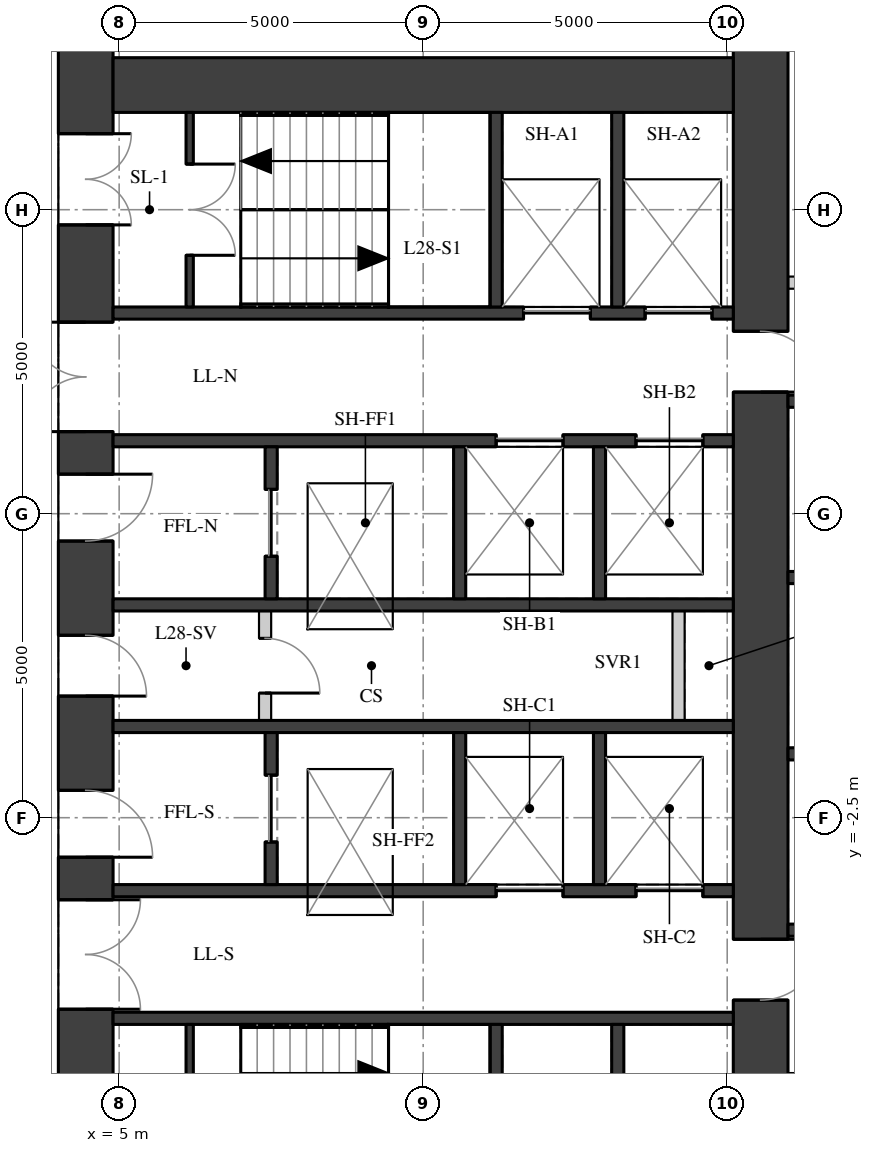
"""IFC4 building model, lengths in metres.
Left out: names, types, materials, properties, quantities, classifications, styles, units other than length and angle.
Written with IfcOpenShell. Run it as: python <this file> out.ifc"""

import sys

from ifc_helpers import new_model, si_unit, direction, frame, frame_2d, origin, place, context, subcontext, project, spatial, rectangle, extrude, element, fill, save


model = new_model("IFC4")
c1 = context("Model", 3, precision=1e-05, world=origin(), true_north=direction((0.0, 1.0)))
c2 = subcontext(c1, "Body", "Model", "MODEL_VIEW")
j1 = project(units=[si_unit("LENGTHUNIT", "METRE"), si_unit("PLANEANGLEUNIT", "RADIAN")], contexts=[c1])
p1 = place(None, origin())
s1 = spatial("IfcSite", under=j1, at=p1, CompositionType="ELEMENT")
p2 = place(p1, origin())
s2 = spatial("IfcBuilding", under=s1, at=p2, CompositionType="ELEMENT")
p3 = place(p2, frame((0.0, 0.0, 102.1)))
s3 = spatial("IfcBuildingStorey", under=s2, at=p3, CompositionType="ELEMENT", Elevation=102.1)
p4 = place(p3, frame((4.45, -11.1, 0.0), z_axis=(0.0, 0.0, 1.0), x_axis=(0.0, 1.0, 0.0)))
e1 = element("IfcWall", 1, at=p4, inside=s3, PredefinedType="SHEAR", context=c2, shape_type="SweptSolid", body=[
    extrude(rectangle(XDim=22.2, YDim=0.9, at=frame_2d((11.1, 0.0))), origin(), (0.0, 0.0, 1.0), 3.02),
])
p5 = place(p4, frame((2.35, 0.0, 0.0)))
e2 = element("IfcOpeningElement", 2, at=p5, cuts=e1, PredefinedType="OPENING", context=c2, shape_type="SweptSolid", body=[
    extrude(rectangle(XDim=1.5, YDim=2.1, at=frame_2d((0.75, 1.05))), frame((0.0, 0.46, 0.0), z_axis=(0.0, -1.0, 0.0), x_axis=(1.0, 0.0, 0.0)), (0.0, 0.0, 1.0), 0.92),
])
p6 = place(p4, frame((5.45, 0.0, 0.0)))
e3 = element("IfcOpeningElement", 3, at=p6, cuts=e1, PredefinedType="OPENING", context=c2, shape_type="SweptSolid", body=[
    extrude(rectangle(XDim=1.8, YDim=2.1, at=frame_2d((0.9, 1.05))), frame((0.0, 0.46, 0.0), z_axis=(0.0, -1.0, 0.0), x_axis=(1.0, 0.0, 0.0)), (0.0, 0.0, 1.0), 0.92),
])
p7 = place(p4, frame((7.95, 0.0, 0.0)))
e4 = element("IfcOpeningElement", 4, at=p7, cuts=e1, PredefinedType="OPENING", context=c2, shape_type="SweptSolid", body=[
    extrude(rectangle(XDim=1.1, YDim=2.1, at=frame_2d((0.55, 1.05))), frame((0.0, 0.46, 0.0), z_axis=(0.0, -1.0, 0.0), x_axis=(1.0, 0.0, 0.0)), (0.0, 0.0, 1.0), 0.92),
])
p8 = place(p4, frame((10.6, 0.0, 0.0)))
e5 = element("IfcOpeningElement", 5, at=p8, cuts=e1, PredefinedType="OPENING", context=c2, shape_type="SweptSolid", body=[
    extrude(rectangle(XDim=1.0, YDim=2.1, at=frame_2d((0.5, 1.05))), frame((0.0, 0.46, 0.0), z_axis=(0.0, -1.0, 0.0), x_axis=(1.0, 0.0, 0.0)), (0.0, 0.0, 1.0), 0.92),
])
p9 = place(p4, frame((13.15, 0.0, 0.0)))
e6 = element("IfcOpeningElement", 6, at=p9, cuts=e1, PredefinedType="OPENING", context=c2, shape_type="SweptSolid", body=[
    extrude(rectangle(XDim=1.1, YDim=2.1, at=frame_2d((0.55, 1.05))), frame((0.0, 0.46, 0.0), z_axis=(0.0, -1.0, 0.0), x_axis=(1.0, 0.0, 0.0)), (0.0, 0.0, 1.0), 0.92),
])
p10 = place(p4, frame((14.95, 0.0, 0.0)))
e7 = element("IfcOpeningElement", 7, at=p10, cuts=e1, PredefinedType="OPENING", context=c2, shape_type="SweptSolid", body=[
    extrude(rectangle(XDim=1.8, YDim=2.1, at=frame_2d((0.9, 1.05))), frame((0.0, 0.46, 0.0), z_axis=(0.0, -1.0, 0.0), x_axis=(1.0, 0.0, 0.0)), (0.0, 0.0, 1.0), 0.92),
])
p11 = place(p4, frame((18.35, 0.0, 0.0)))
e8 = element("IfcOpeningElement", 8, at=p11, cuts=e1, PredefinedType="OPENING", context=c2, shape_type="SweptSolid", body=[
    extrude(rectangle(XDim=1.5, YDim=2.1, at=frame_2d((0.75, 1.05))), frame((0.0, 0.46, 0.0), z_axis=(0.0, -1.0, 0.0), x_axis=(1.0, 0.0, 0.0)), (0.0, 0.0, 1.0), 0.92),
])
p12 = place(p3, frame((15.55, -11.1, 0.0), z_axis=(0.0, 0.0, 1.0), x_axis=(0.0, 1.0, 0.0)))
e9 = element("IfcWall", 9, at=p12, inside=s3, PredefinedType="SHEAR", context=c2, shape_type="SweptSolid", body=[
    extrude(rectangle(XDim=22.2, YDim=0.9, at=frame_2d((11.1, 0.0))), origin(), (0.0, 0.0, 1.0), 3.02),
])
p13 = place(p12, frame((15.6, 0.0, 0.0)))
e10 = element("IfcOpeningElement", 10, at=p13, cuts=e9, PredefinedType="OPENING", context=c2, shape_type="SweptSolid", body=[
    extrude(rectangle(XDim=1.0, YDim=2.1, at=frame_2d((0.5, 1.05))), frame((0.0, 0.46, 0.0), z_axis=(0.0, -1.0, 0.0), x_axis=(1.0, 0.0, 0.0)), (0.0, 0.0, 1.0), 0.92),
])
p14 = place(p12, frame((5.6, 0.0, 0.0)))
e11 = element("IfcOpeningElement", 11, at=p14, cuts=e9, PredefinedType="OPENING", context=c2, shape_type="SweptSolid", body=[
    extrude(rectangle(XDim=1.0, YDim=2.1, at=frame_2d((0.5, 1.05))), frame((0.0, 0.46, 0.0), z_axis=(0.0, -1.0, 0.0), x_axis=(1.0, 0.0, 0.0)), (0.0, 0.0, 1.0), 0.92),
])
p15 = place(p3, frame((4.9, 9.55, 0.0), z_axis=(0.0, 0.0, 1.0), x_axis=(1.0, 0.0, 0.0)))
e12 = element("IfcWall", 12, at=p15, inside=s3, PredefinedType="SHEAR", context=c2, shape_type="SweptSolid", body=[
    extrude(rectangle(XDim=10.2, YDim=0.9, at=frame_2d((5.1, 0.0))), origin(), (0.0, 0.0, 1.0), 3.02),
])
p16 = place(p3, frame((4.9, 5.8, 0.0), z_axis=(0.0, 0.0, 1.0), x_axis=(1.0, 0.0, 0.0)))
e13 = element("IfcWall", 13, at=p16, inside=s3, PredefinedType="SHEAR", context=c2, shape_type="SweptSolid", body=[
    extrude(rectangle(XDim=10.2, YDim=0.2, at=frame_2d((5.1, 0.0))), origin(), (0.0, 0.0, 1.0), 3.02),
])
p17 = place(p16, frame((6.75, 0.0, 0.0)))
e14 = element("IfcOpeningElement", 14, at=p17, cuts=e13, PredefinedType="OPENING", context=c2, shape_type="SweptSolid", body=[
    extrude(rectangle(XDim=1.1, YDim=2.1, at=frame_2d((0.55, 1.05))), frame((0.0, 0.11, 0.0), z_axis=(0.0, -1.0, 0.0), x_axis=(1.0, 0.0, 0.0)), (0.0, 0.0, 1.0), 0.22),
])
p18 = place(p16, frame((8.75, 0.0, 0.0)))
e15 = element("IfcOpeningElement", 15, at=p18, cuts=e13, PredefinedType="OPENING", context=c2, shape_type="SweptSolid", body=[
    extrude(rectangle(XDim=1.1, YDim=2.1, at=frame_2d((0.55, 1.05))), frame((0.0, 0.11, 0.0), z_axis=(0.0, -1.0, 0.0), x_axis=(1.0, 0.0, 0.0)), (0.0, 0.0, 1.0), 0.22),
])
p19 = place(p3, frame((4.9, 3.7, 0.0), z_axis=(0.0, 0.0, 1.0), x_axis=(1.0, 0.0, 0.0)))
e16 = element("IfcWall", 16, at=p19, inside=s3, PredefinedType="SHEAR", context=c2, shape_type="SweptSolid", body=[
    extrude(rectangle(XDim=10.2, YDim=0.2, at=frame_2d((5.1, 0.0))), origin(), (0.0, 0.0, 1.0), 3.02),
])
p20 = place(p19, frame((6.3, 0.0, 0.0)))
e17 = element("IfcOpeningElement", 17, at=p20, cuts=e16, PredefinedType="OPENING", context=c2, shape_type="SweptSolid", body=[
    extrude(rectangle(XDim=1.1, YDim=2.1, at=frame_2d((0.55, 1.05))), frame((0.0, 0.11, 0.0), z_axis=(0.0, -1.0, 0.0), x_axis=(1.0, 0.0, 0.0)), (0.0, 0.0, 1.0), 0.22),
])
p21 = place(p19, frame((8.6, 0.0, 0.0)))
e18 = element("IfcOpeningElement", 18, at=p21, cuts=e16, PredefinedType="OPENING", context=c2, shape_type="SweptSolid", body=[
    extrude(rectangle(XDim=1.1, YDim=2.1, at=frame_2d((0.55, 1.05))), frame((0.0, 0.11, 0.0), z_axis=(0.0, -1.0, 0.0), x_axis=(1.0, 0.0, 0.0)), (0.0, 0.0, 1.0), 0.22),
])
for number, where, z_axis, x_axis in (
    (19, (4.9, 1.0, 0.0), (0.0, 0.0, 1.0), (1.0, 0.0, 0.0)),
    (20, (4.9, -1.0, 0.0), (0.0, 0.0, 1.0), (1.0, 0.0, 0.0)),
):
    element("IfcWall", number, at=place(p3, frame(where, z_axis=z_axis, x_axis=x_axis)), inside=s3, PredefinedType="SHEAR", context=c2, shape_type="SweptSolid", body=[
        extrude(rectangle(XDim=10.2, YDim=0.2, at=frame_2d((5.1, 0.0))), origin(), (0.0, 0.0, 1.0), 3.02),
    ])
p22 = place(p3, frame((4.9, -3.7, 0.0), z_axis=(0.0, 0.0, 1.0), x_axis=(1.0, 0.0, 0.0)))
e21 = element("IfcWall", 21, at=p22, inside=s3, PredefinedType="SHEAR", context=c2, shape_type="SweptSolid", body=[
    extrude(rectangle(XDim=10.2, YDim=0.2, at=frame_2d((5.1, 0.0))), origin(), (0.0, 0.0, 1.0), 3.02),
])
p23 = place(p22, frame((6.3, 0.0, 0.0)))
e22 = element("IfcOpeningElement", 22, at=p23, cuts=e21, PredefinedType="OPENING", context=c2, shape_type="SweptSolid", body=[
    extrude(rectangle(XDim=1.1, YDim=2.1, at=frame_2d((0.55, 1.05))), frame((0.0, 0.11, 0.0), z_axis=(0.0, -1.0, 0.0), x_axis=(1.0, 0.0, 0.0)), (0.0, 0.0, 1.0), 0.22),
])
p24 = place(p22, frame((8.6, 0.0, 0.0)))
e23 = element("IfcOpeningElement", 23, at=p24, cuts=e21, PredefinedType="OPENING", context=c2, shape_type="SweptSolid", body=[
    extrude(rectangle(XDim=1.1, YDim=2.1, at=frame_2d((0.55, 1.05))), frame((0.0, 0.11, 0.0), z_axis=(0.0, -1.0, 0.0), x_axis=(1.0, 0.0, 0.0)), (0.0, 0.0, 1.0), 0.22),
])
p25 = place(p3, frame((4.9, -5.8, 0.0), z_axis=(0.0, 0.0, 1.0), x_axis=(1.0, 0.0, 0.0)))
e24 = element("IfcWall", 24, at=p25, inside=s3, PredefinedType="SHEAR", context=c2, shape_type="SweptSolid", body=[
    extrude(rectangle(XDim=10.2, YDim=0.2, at=frame_2d((5.1, 0.0))), origin(), (0.0, 0.0, 1.0), 3.02),
])
for number, where, z_axis, x_axis in (
    (25, (11.2, 5.9, 0.0), (0.0, 0.0, 1.0), (0.0, 1.0, 0.0)),
    (26, (11.2, -9.1, 0.0), (0.0, 0.0, 1.0), (0.0, 1.0, 0.0)),
    (27, (13.2, 5.9, 0.0), (0.0, 0.0, 1.0), (0.0, 1.0, 0.0)),
    (28, (13.2, -9.1, 0.0), (0.0, 0.0, 1.0), (0.0, 1.0, 0.0)),
):
    element("IfcWall", number, at=place(p3, frame(where, z_axis=z_axis, x_axis=x_axis)), inside=s3, PredefinedType="SHEAR", context=c2, shape_type="SweptSolid", body=[
        extrude(rectangle(XDim=3.2, YDim=0.2, at=frame_2d((1.6, 0.0))), origin(), (0.0, 0.0, 1.0), 3.02),
    ])
p26 = place(p3, frame((7.5, 1.1, 0.0), z_axis=(0.0, 0.0, 1.0), x_axis=(0.0, 1.0, 0.0)))
e29 = element("IfcWall", 29, at=p26, inside=s3, PredefinedType="SHEAR", context=c2, shape_type="SweptSolid", body=[
    extrude(rectangle(XDim=2.5, YDim=0.2, at=frame_2d((1.25, 0.0))), origin(), (0.0, 0.0, 1.0), 3.02),
])
p27 = place(p26, frame((0.7, 0.0, 0.0)))
e30 = element("IfcOpeningElement", 30, at=p27, cuts=e29, PredefinedType="OPENING", context=c2, shape_type="SweptSolid", body=[
    extrude(rectangle(XDim=1.1, YDim=2.1, at=frame_2d((0.55, 1.05))), frame((0.0, 0.11, 0.0), z_axis=(0.0, -1.0, 0.0), x_axis=(1.0, 0.0, 0.0)), (0.0, 0.0, 1.0), 0.22),
])
p28 = place(p3, frame((7.5, -3.6, 0.0), z_axis=(0.0, 0.0, 1.0), x_axis=(0.0, 1.0, 0.0)))
e31 = element("IfcWall", 31, at=p28, inside=s3, PredefinedType="SHEAR", context=c2, shape_type="SweptSolid", body=[
    extrude(rectangle(XDim=2.5, YDim=0.2, at=frame_2d((1.25, 0.0))), origin(), (0.0, 0.0, 1.0), 3.02),
])
p29 = place(p28, frame((0.7, 0.0, 0.0)))
e32 = element("IfcOpeningElement", 32, at=p29, cuts=e31, PredefinedType="OPENING", context=c2, shape_type="SweptSolid", body=[
    extrude(rectangle(XDim=1.1, YDim=2.1, at=frame_2d((0.55, 1.05))), frame((0.0, 0.11, 0.0), z_axis=(0.0, -1.0, 0.0), x_axis=(1.0, 0.0, 0.0)), (0.0, 0.0, 1.0), 0.22),
])
for number, where, z_axis, x_axis in (
    (33, (10.6, 1.1, 0.0), (0.0, 0.0, 1.0), (0.0, 1.0, 0.0)),
    (34, (10.6, -3.6, 0.0), (0.0, 0.0, 1.0), (0.0, 1.0, 0.0)),
    (35, (12.9, 1.1, 0.0), (0.0, 0.0, 1.0), (0.0, 1.0, 0.0)),
    (36, (12.9, -3.6, 0.0), (0.0, 0.0, 1.0), (0.0, 1.0, 0.0)),
):
    element("IfcWall", number, at=place(p3, frame(where, z_axis=z_axis, x_axis=x_axis)), inside=s3, PredefinedType="SHEAR", context=c2, shape_type="SweptSolid", body=[
        extrude(rectangle(XDim=2.5, YDim=0.2, at=frame_2d((1.25, 0.0))), origin(), (0.0, 0.0, 1.0), 3.02),
    ])
p30 = place(p3, frame((6.16, 5.9, 0.0), z_axis=(0.0, 0.0, 1.0), x_axis=(0.0, 1.0, 0.0)))
e37 = element("IfcWall", 37, at=p30, inside=s3, PredefinedType="SHEAR", context=c2, shape_type="SweptSolid", body=[
    extrude(rectangle(XDim=3.2, YDim=0.12, at=frame_2d((1.6, 0.0))), origin(), (0.0, 0.0, 1.0), 3.02),
])
p31 = place(p30, frame((0.85, 0.0, 0.0)))
e38 = element("IfcOpeningElement", 38, at=p31, cuts=e37, PredefinedType="OPENING", context=c2, shape_type="SweptSolid", body=[
    extrude(rectangle(XDim=1.5, YDim=2.1, at=frame_2d((0.75, 1.05))), frame((0.0, 0.07, 0.0), z_axis=(0.0, -1.0, 0.0), x_axis=(1.0, 0.0, 0.0)), (0.0, 0.0, 1.0), 0.14),
])
p32 = place(p3, frame((6.16, -9.1, 0.0), z_axis=(0.0, 0.0, 1.0), x_axis=(0.0, 1.0, 0.0)))
e39 = element("IfcWall", 39, at=p32, inside=s3, PredefinedType="SHEAR", context=c2, shape_type="SweptSolid", body=[
    extrude(rectangle(XDim=3.2, YDim=0.12, at=frame_2d((1.6, 0.0))), origin(), (0.0, 0.0, 1.0), 3.02),
])
p33 = place(p32, frame((0.85, 0.0, 0.0)))
e40 = element("IfcOpeningElement", 40, at=p33, cuts=e39, PredefinedType="OPENING", context=c2, shape_type="SweptSolid", body=[
    extrude(rectangle(XDim=1.5, YDim=2.1, at=frame_2d((0.75, 1.05))), frame((0.0, 0.07, 0.0), z_axis=(0.0, -1.0, 0.0), x_axis=(1.0, 0.0, 0.0)), (0.0, 0.0, 1.0), 0.14),
])
p34 = place(p3, frame((7.4, -0.9, 0.0), z_axis=(0.0, 0.0, 1.0), x_axis=(0.0, 1.0, 0.0)))
e41 = element("IfcWall", 41, at=p34, inside=s3, PredefinedType="PARTITIONING", context=c2, shape_type="SweptSolid", body=[
    extrude(rectangle(XDim=1.8, YDim=0.2, at=frame_2d((0.9, 0.0))), origin(), (0.0, 0.0, 1.0), 3.02),
])
p35 = place(p34, frame((0.45, 0.0, 0.0)))
e42 = element("IfcOpeningElement", 42, at=p35, cuts=e41, PredefinedType="OPENING", context=c2, shape_type="SweptSolid", body=[
    extrude(rectangle(XDim=0.9, YDim=2.1, at=frame_2d((0.45, 1.05))), frame((0.0, 0.11, 0.0), z_axis=(0.0, -1.0, 0.0), x_axis=(1.0, 0.0, 0.0)), (0.0, 0.0, 1.0), 0.22),
])
p36 = place(p3, frame((14.2, -0.9, 0.0), z_axis=(0.0, 0.0, 1.0), x_axis=(0.0, 1.0, 0.0)))
e43 = element("IfcWall", 43, at=p36, inside=s3, PredefinedType="PARTITIONING", context=c2, shape_type="SweptSolid", body=[
    extrude(rectangle(XDim=1.8, YDim=0.2, at=frame_2d((0.9, 0.0))), origin(), (0.0, 0.0, 1.0), 3.02),
])
for number, where, z_axis, x_axis in (
    (44, (16.0, -4.35, 0.0), (0.0, 0.0, 1.0), (1.0, 0.0, 0.0)),
    (45, (16.0, -1.45, 0.0), (0.0, 0.0, 1.0), (1.0, 0.0, 0.0)),
    (46, (16.0, 1.45, 0.0), (0.0, 0.0, 1.0), (1.0, 0.0, 0.0)),
    (47, (16.0, 4.35, 0.0), (0.0, 0.0, 1.0), (1.0, 0.0, 0.0)),
):
    element("IfcWall", number, at=place(p3, frame(where, z_axis=z_axis, x_axis=x_axis)), inside=s3, PredefinedType="SHEAR", context=c2, shape_type="SweptSolid", body=[
        extrude(rectangle(XDim=2.3, YDim=0.2, at=frame_2d((1.15, 0.0))), origin(), (0.0, 0.0, 1.0), 3.02),
    ])
p37 = place(p3, frame((16.0, 6.3, 0.0), z_axis=(0.0, 0.0, 1.0), x_axis=(1.0, 0.0, 0.0)))
e48 = element("IfcWall", 48, at=p37, inside=s3, PredefinedType="PARTITIONING", context=c2, shape_type="SweptSolid", body=[
    extrude(rectangle(XDim=2.3, YDim=0.2, at=frame_2d((1.15, 0.0))), origin(), (0.0, 0.0, 1.0), 3.02),
])
p38 = place(p37, frame((0.3, 0.0, 0.0)))
e49 = element("IfcOpeningElement", 49, at=p38, cuts=e48, PredefinedType="OPENING", context=c2, shape_type="SweptSolid", body=[
    extrude(rectangle(XDim=0.9, YDim=2.1, at=frame_2d((0.45, 1.05))), frame((0.0, 0.11, 0.0), z_axis=(0.0, -1.0, 0.0), x_axis=(1.0, 0.0, 0.0)), (0.0, 0.0, 1.0), 0.22),
])
p39 = place(p6, origin())
e50 = element("IfcDoor", 50, at=p39, inside=s3, OperationType="DOUBLE_DOOR_SINGLE_SWING", PredefinedType="DOOR", context=c2, shape_type="SweptSolid", body=[
    extrude(rectangle(XDim=1.8, YDim=2.1, at=frame_2d((0.9, 1.05))), frame((0.0, 0.025, 0.0), z_axis=(0.0, -1.0, 0.0), x_axis=(1.0, 0.0, 0.0)), (0.0, 0.0, 1.0), 0.05),
])
fill(e3, e50)
p40 = place(p7, origin())
e51 = element("IfcDoor", 51, at=p40, inside=s3, OperationType="SINGLE_SWING_RIGHT", PredefinedType="DOOR", context=c2, shape_type="SweptSolid", body=[
    extrude(rectangle(XDim=1.1, YDim=2.1, at=frame_2d((0.55, 1.05))), frame((0.0, 0.025, 0.0), z_axis=(0.0, -1.0, 0.0), x_axis=(1.0, 0.0, 0.0)), (0.0, 0.0, 1.0), 0.05),
])
fill(e4, e51)
p41 = place(p8, origin())
e52 = element("IfcDoor", 52, at=p41, inside=s3, OperationType="SINGLE_SWING_RIGHT", PredefinedType="DOOR", context=c2, shape_type="SweptSolid", body=[
    extrude(rectangle(XDim=1.0, YDim=2.1, at=frame_2d((0.5, 1.05))), frame((0.0, 0.025, 0.0), z_axis=(0.0, -1.0, 0.0), x_axis=(1.0, 0.0, 0.0)), (0.0, 0.0, 1.0), 0.05),
])
fill(e5, e52)
p42 = place(p9, origin())
e53 = element("IfcDoor", 53, at=p42, inside=s3, OperationType="SINGLE_SWING_LEFT", PredefinedType="DOOR", context=c2, shape_type="SweptSolid", body=[
    extrude(rectangle(XDim=1.1, YDim=2.1, at=frame_2d((0.55, 1.05))), frame((0.0, 0.025, 0.0), z_axis=(0.0, -1.0, 0.0), x_axis=(1.0, 0.0, 0.0)), (0.0, 0.0, 1.0), 0.05),
])
fill(e6, e53)
p43 = place(p10, origin())
e54 = element("IfcDoor", 54, at=p43, inside=s3, OperationType="DOUBLE_DOOR_SINGLE_SWING", PredefinedType="DOOR", context=c2, shape_type="SweptSolid", body=[
    extrude(rectangle(XDim=1.8, YDim=2.1, at=frame_2d((0.9, 1.05))), frame((0.0, 0.025, 0.0), z_axis=(0.0, -1.0, 0.0), x_axis=(1.0, 0.0, 0.0)), (0.0, 0.0, 1.0), 0.05),
])
fill(e7, e54)
p44 = place(p11, origin())
e55 = element("IfcDoor", 55, at=p44, inside=s3, OperationType="DOUBLE_DOOR_SINGLE_SWING", PredefinedType="DOOR", context=c2, shape_type="SweptSolid", body=[
    extrude(rectangle(XDim=1.5, YDim=2.1, at=frame_2d((0.75, 1.05))), frame((0.0, 0.025, 0.0), z_axis=(0.0, -1.0, 0.0), x_axis=(1.0, 0.0, 0.0)), (0.0, 0.0, 1.0), 0.05),
])
fill(e8, e55)
p45 = place(p31, origin())
e56 = element("IfcDoor", 56, at=p45, inside=s3, OperationType="DOUBLE_DOOR_SINGLE_SWING", PredefinedType="DOOR", context=c2, shape_type="SweptSolid", body=[
    extrude(rectangle(XDim=1.5, YDim=2.1, at=frame_2d((0.75, 1.05))), frame((0.0, 0.025, 0.0), z_axis=(0.0, -1.0, 0.0), x_axis=(1.0, 0.0, 0.0)), (0.0, 0.0, 1.0), 0.05),
])
fill(e38, e56)
p46 = place(p17, origin())
e57 = element("IfcDoor", 57, at=p46, inside=s3, OperationType="DOUBLE_DOOR_SLIDING", PredefinedType="DOOR", context=c2, shape_type="SweptSolid", body=[
    extrude(rectangle(XDim=1.1, YDim=2.1, at=frame_2d((0.55, 1.05))), frame((0.0, 0.025, 0.0), z_axis=(0.0, -1.0, 0.0), x_axis=(1.0, 0.0, 0.0)), (0.0, 0.0, 1.0), 0.05),
])
fill(e14, e57)
p47 = place(p18, origin())
e58 = element("IfcDoor", 58, at=p47, inside=s3, OperationType="DOUBLE_DOOR_SLIDING", PredefinedType="DOOR", context=c2, shape_type="SweptSolid", body=[
    extrude(rectangle(XDim=1.1, YDim=2.1, at=frame_2d((0.55, 1.05))), frame((0.0, 0.025, 0.0), z_axis=(0.0, -1.0, 0.0), x_axis=(1.0, 0.0, 0.0)), (0.0, 0.0, 1.0), 0.05),
])
fill(e15, e58)
p48 = place(p20, origin())
e59 = element("IfcDoor", 59, at=p48, inside=s3, OperationType="DOUBLE_DOOR_SLIDING", PredefinedType="DOOR", context=c2, shape_type="SweptSolid", body=[
    extrude(rectangle(XDim=1.1, YDim=2.1, at=frame_2d((0.55, 1.05))), frame((0.0, 0.025, 0.0), z_axis=(0.0, -1.0, 0.0), x_axis=(1.0, 0.0, 0.0)), (0.0, 0.0, 1.0), 0.05),
])
fill(e17, e59)
p49 = place(p21, origin())
e60 = element("IfcDoor", 60, at=p49, inside=s3, OperationType="DOUBLE_DOOR_SLIDING", PredefinedType="DOOR", context=c2, shape_type="SweptSolid", body=[
    extrude(rectangle(XDim=1.1, YDim=2.1, at=frame_2d((0.55, 1.05))), frame((0.0, 0.025, 0.0), z_axis=(0.0, -1.0, 0.0), x_axis=(1.0, 0.0, 0.0)), (0.0, 0.0, 1.0), 0.05),
])
fill(e18, e60)
p50 = place(p23, origin())
e61 = element("IfcDoor", 61, at=p50, inside=s3, OperationType="DOUBLE_DOOR_SLIDING", PredefinedType="DOOR", context=c2, shape_type="SweptSolid", body=[
    extrude(rectangle(XDim=1.1, YDim=2.1, at=frame_2d((0.55, 1.05))), frame((0.0, 0.025, 0.0), z_axis=(0.0, -1.0, 0.0), x_axis=(1.0, 0.0, 0.0)), (0.0, 0.0, 1.0), 0.05),
])
fill(e22, e61)
p51 = place(p24, origin())
e62 = element("IfcDoor", 62, at=p51, inside=s3, OperationType="DOUBLE_DOOR_SLIDING", PredefinedType="DOOR", context=c2, shape_type="SweptSolid", body=[
    extrude(rectangle(XDim=1.1, YDim=2.1, at=frame_2d((0.55, 1.05))), frame((0.0, 0.025, 0.0), z_axis=(0.0, -1.0, 0.0), x_axis=(1.0, 0.0, 0.0)), (0.0, 0.0, 1.0), 0.05),
])
fill(e23, e62)
p52 = place(p27, origin())
e63 = element("IfcDoor", 63, at=p52, inside=s3, OperationType="DOUBLE_DOOR_SLIDING", PredefinedType="DOOR", context=c2, shape_type="SweptSolid", body=[
    extrude(rectangle(XDim=1.1, YDim=2.1, at=frame_2d((0.55, 1.05))), frame((0.0, 0.025, 0.0), z_axis=(0.0, -1.0, 0.0), x_axis=(1.0, 0.0, 0.0)), (0.0, 0.0, 1.0), 0.05),
])
fill(e30, e63)
p53 = place(p29, origin())
e64 = element("IfcDoor", 64, at=p53, inside=s3, OperationType="DOUBLE_DOOR_SLIDING", PredefinedType="DOOR", context=c2, shape_type="SweptSolid", body=[
    extrude(rectangle(XDim=1.1, YDim=2.1, at=frame_2d((0.55, 1.05))), frame((0.0, 0.025, 0.0), z_axis=(0.0, -1.0, 0.0), x_axis=(1.0, 0.0, 0.0)), (0.0, 0.0, 1.0), 0.05),
])
fill(e32, e64)
p54 = place(p35, origin())
e65 = element("IfcDoor", 65, at=p54, inside=s3, OperationType="SINGLE_SWING_RIGHT", PredefinedType="DOOR", context=c2, shape_type="SweptSolid", body=[
    extrude(rectangle(XDim=0.9, YDim=2.1, at=frame_2d((0.45, 1.05))), frame((0.0, 0.025, 0.0), z_axis=(0.0, -1.0, 0.0), x_axis=(1.0, 0.0, 0.0)), (0.0, 0.0, 1.0), 0.05),
])
fill(e42, e65)
p55 = place(p13, origin())
e66 = element("IfcDoor", 66, at=p55, inside=s3, OperationType="SINGLE_SWING_RIGHT", PredefinedType="DOOR", context=c2, shape_type="SweptSolid", body=[
    extrude(rectangle(XDim=1.0, YDim=2.1, at=frame_2d((0.5, 1.05))), frame((0.0, 0.025, 0.0), z_axis=(0.0, -1.0, 0.0), x_axis=(1.0, 0.0, 0.0)), (0.0, 0.0, 1.0), 0.05),
])
fill(e10, e66)
p56 = place(p14, origin())
e67 = element("IfcDoor", 67, at=p56, inside=s3, OperationType="SINGLE_SWING_LEFT", PredefinedType="DOOR", context=c2, shape_type="SweptSolid", body=[
    extrude(rectangle(XDim=1.0, YDim=2.1, at=frame_2d((0.5, 1.05))), frame((0.0, 0.025, 0.0), z_axis=(0.0, -1.0, 0.0), x_axis=(1.0, 0.0, 0.0)), (0.0, 0.0, 1.0), 0.05),
])
fill(e11, e67)
save(model, sys.argv[1])
